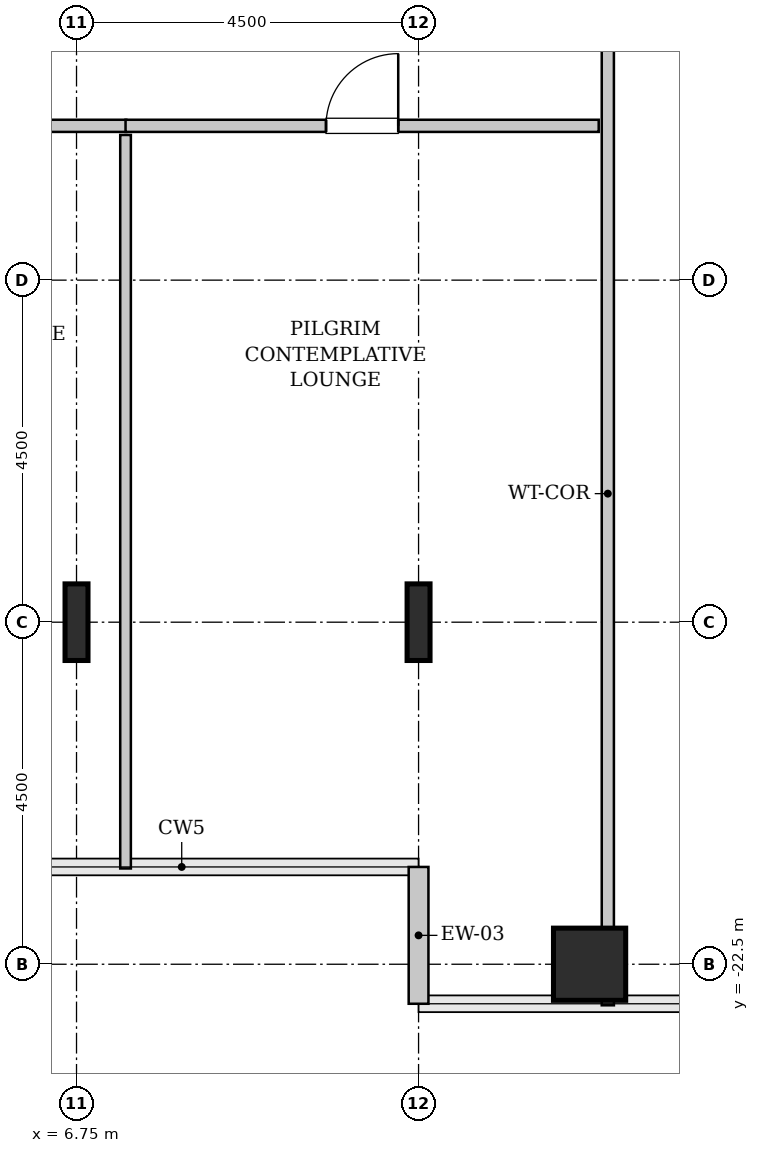
"""IFC4 building model, lengths in metres.
Left out: names, types, materials, properties, quantities, classifications, styles, units other than length and angle.
Written with IfcOpenShell. Run it as: python <this file> out.ifc"""

import sys

from ifc_helpers import new_model, si_unit, direction, frame, frame_2d, origin, origin_2d, place, context, subcontext, project, spatial, rectangle, hollow_rectangle, i_section, extrude, source, transform, mapped, element, fill, save


model = new_model("IFC4")
c1 = context("Model", 3, precision=1e-05, world=origin(), true_north=direction((0.0, 1.0)))
c2 = subcontext(c1, "Body", "Model", "MODEL_VIEW")
j1 = project(units=[si_unit("LENGTHUNIT", "METRE"), si_unit("PLANEANGLEUNIT", "RADIAN")], contexts=[c1])
p1 = place(None, origin())
s1 = spatial("IfcSite", under=j1, at=p1, CompositionType="ELEMENT")
p2 = place(p1, origin())
s2 = spatial("IfcBuilding", under=s1, at=p2, CompositionType="ELEMENT")
p3 = place(p2, frame((0.0, 0.0, 98.4)))
s3 = spatial("IfcBuildingStorey", under=s2, at=p3, CompositionType="ELEMENT", Elevation=98.4)
m1 = source(origin(), c2, "Body", "SweptSolid", [
    extrude(i_section(OverallWidth=0.302, OverallDepth=1.008, WebThickness=0.021, FlangeThickness=0.04, FilletRadius=0.03, at=origin_2d()), origin(), (0.0, 0.0, 1.0), 3.8),
])
for number, where, z_axis, x_axis in (
    (1, (6.75, -18.0, 0.0), (0.0, 0.0, 1.0), (1.0, 0.0, 0.0)),
    (2, (11.25, -18.0, 0.0), (0.0, 0.0, 1.0), (1.0, 0.0, 0.0)),
):
    element("IfcColumn", number, at=place(p3, frame(where, z_axis=z_axis, x_axis=x_axis)), inside=s3, PredefinedType="COLUMN", context=c2, shape_type="MappedRepresentation", body=[
        mapped(m1, transform((0.0, 0.0, 0.0), x_axis=(1.0, 0.0, 0.0), y_axis=(0.0, 1.0, 0.0), z_axis=(0.0, 0.0, 1.0), scale=1.0)),
    ])
m2 = source(origin(), c2, "Body", "SweptSolid", [
    extrude(hollow_rectangle(XDim=0.95, YDim=0.95, WallThickness=0.045, InnerFilletRadius=0.045, OuterFilletRadius=0.09, at=origin_2d()), origin(), (0.0, 0.0, 1.0), 3.8),
])
p4 = place(p3, frame((13.5, -22.5, 0.0), z_axis=(0.0, 0.0, 1.0), x_axis=(1.0, 0.0, 0.0)))
e3 = element("IfcColumn", 3, at=p4, inside=s3, PredefinedType="COLUMN", context=c2, shape_type="MappedRepresentation", body=[
    mapped(m2, transform((0.0, 0.0, 0.0), x_axis=(1.0, 0.0, 0.0), y_axis=(0.0, 1.0, 0.0), z_axis=(0.0, 0.0, 1.0), scale=1.0)),
])
m3 = source(origin(), c2, "Body", "SweptSolid", [
    extrude(rectangle(XDim=1.8, YDim=0.26, at=frame_2d((0.9, 0.0))), origin(), (0.0, 0.0, 1.0), 3.55),
])
p5 = place(p3, frame((11.25, -21.22, 0.0), z_axis=(0.0, 0.0, 1.0), x_axis=(0.0, -1.0, 0.0)))
e4 = element("IfcWall", 4, at=p5, inside=s3, PredefinedType="SOLIDWALL", context=c2, shape_type="MappedRepresentation", body=[
    mapped(m3, transform((0.0, 0.0, 0.0), x_axis=(1.0, 0.0, 0.0), y_axis=(0.0, 1.0, 0.0), z_axis=(0.0, 0.0, 1.0), scale=1.0)),
])
m4 = source(origin(), c2, "Body", "SweptSolid", [
    extrude(rectangle(XDim=16.245, YDim=0.16, at=frame_2d((8.123, 0.0))), origin(), (0.0, 0.0, 1.0), 3.535),
])
p6 = place(p3, frame((13.74, -23.04, 0.0), z_axis=(0.0, 0.0, 1.0), x_axis=(0.0, 1.0, 0.0)))
e5 = element("IfcWall", 5, at=p6, inside=s3, PredefinedType="PARTITIONING", context=c2, shape_type="MappedRepresentation", body=[
    mapped(m4, transform((0.0, 0.0, 0.0), x_axis=(1.0, 0.0, 0.0), y_axis=(0.0, 1.0, 0.0), z_axis=(0.0, 0.0, 1.0), scale=1.0)),
])
p7 = place(p6, frame((13.413, 0.0, 0.0)))
e6 = element("IfcOpeningElement", 6, at=p7, cuts=e5, PredefinedType="OPENING", context=c2, shape_type="SweptSolid", body=[
    extrude(rectangle(XDim=0.95, YDim=2.1, at=frame_2d((0.475, 1.05))), frame((0.0, 0.09, 0.0), z_axis=(0.0, -1.0, 0.0), x_axis=(1.0, 0.0, 0.0)), (0.0, 0.0, 1.0), 0.18),
])
m5 = source(origin(), c2, "Body", "SweptSolid", [
    extrude(rectangle(XDim=3.905, YDim=0.16, at=frame_2d((1.953, 0.0))), origin(), (0.0, 0.0, 1.0), 3.535),
])
p8 = place(p3, frame((3.5, -11.47, 0.0), z_axis=(0.0, 0.0, 1.0), x_axis=(1.0, 0.0, 0.0)))
e7 = element("IfcWall", 7, at=p8, inside=s3, PredefinedType="PARTITIONING", context=c2, shape_type="MappedRepresentation", body=[
    mapped(m5, transform((0.0, 0.0, 0.0), x_axis=(1.0, 0.0, 0.0), y_axis=(0.0, 1.0, 0.0), z_axis=(0.0, 0.0, 1.0), scale=1.0)),
])
p9 = place(p8, frame((1.478, 0.0, 0.0)))
e8 = element("IfcOpeningElement", 8, at=p9, cuts=e7, PredefinedType="OPENING", context=c2, shape_type="SweptSolid", body=[
    extrude(rectangle(XDim=0.95, YDim=2.1, at=frame_2d((0.475, 1.05))), frame((0.0, 0.09, 0.0), z_axis=(0.0, -1.0, 0.0), x_axis=(1.0, 0.0, 0.0)), (0.0, 0.0, 1.0), 0.18),
])
m6 = source(origin(), c2, "Body", "SweptSolid", [
    extrude(rectangle(XDim=9.65, YDim=0.14, at=frame_2d((4.825, 0.0))), origin(), (0.0, 0.0, 1.0), 3.535),
])
p10 = place(p3, frame((7.395, -21.24, 0.0), z_axis=(0.0, 0.0, 1.0), x_axis=(0.0, 1.0, 0.0)))
e9 = element("IfcWall", 9, at=p10, inside=s3, PredefinedType="PARTITIONING", context=c2, shape_type="MappedRepresentation", body=[
    mapped(m6, transform((0.0, 0.0, 0.0), x_axis=(1.0, 0.0, 0.0), y_axis=(0.0, 1.0, 0.0), z_axis=(0.0, 0.0, 1.0), scale=1.0)),
])
m7 = source(origin(), c2, "Body", "SweptSolid", [
    extrude(rectangle(XDim=6.225, YDim=0.16, at=frame_2d((3.113, 0.0))), origin(), (0.0, 0.0, 1.0), 3.535),
])
p11 = place(p3, frame((7.395, -11.47, 0.0), z_axis=(0.0, 0.0, 1.0), x_axis=(1.0, 0.0, 0.0)))
e10 = element("IfcWall", 10, at=p11, inside=s3, PredefinedType="PARTITIONING", context=c2, shape_type="MappedRepresentation", body=[
    mapped(m7, transform((0.0, 0.0, 0.0), x_axis=(1.0, 0.0, 0.0), y_axis=(0.0, 1.0, 0.0), z_axis=(0.0, 0.0, 1.0), scale=1.0)),
])
p12 = place(p11, frame((2.637, 0.0, 0.0)))
e11 = element("IfcOpeningElement", 11, at=p12, cuts=e10, PredefinedType="OPENING", context=c2, shape_type="SweptSolid", body=[
    extrude(rectangle(XDim=0.95, YDim=2.1, at=frame_2d((0.475, 1.05))), frame((0.0, 0.09, 0.0), z_axis=(0.0, -1.0, 0.0), x_axis=(1.0, 0.0, 0.0)), (0.0, 0.0, 1.0), 0.18),
])
m8 = source(origin(), c2, "Body", "SweptSolid", [
    extrude(rectangle(XDim=0.95, YDim=2.1, at=frame_2d((0.475, 1.05))), frame((0.0, 0.025, 0.0), z_axis=(0.0, -1.0, 0.0), x_axis=(1.0, 0.0, 0.0)), (0.0, 0.0, 1.0), 0.05),
])
p13 = place(p12, origin())
e12 = element("IfcDoor", 12, at=p13, inside=s3, OperationType="SINGLE_SWING_RIGHT", PredefinedType="DOOR", context=c2, shape_type="MappedRepresentation", body=[
    mapped(m8, transform((0.0, 0.0, 0.0), x_axis=(1.0, 0.0, 0.0), y_axis=(0.0, 1.0, 0.0), z_axis=(0.0, 0.0, 1.0), scale=1.0)),
])
fill(e11, e12)
save(model, sys.argv[1])
